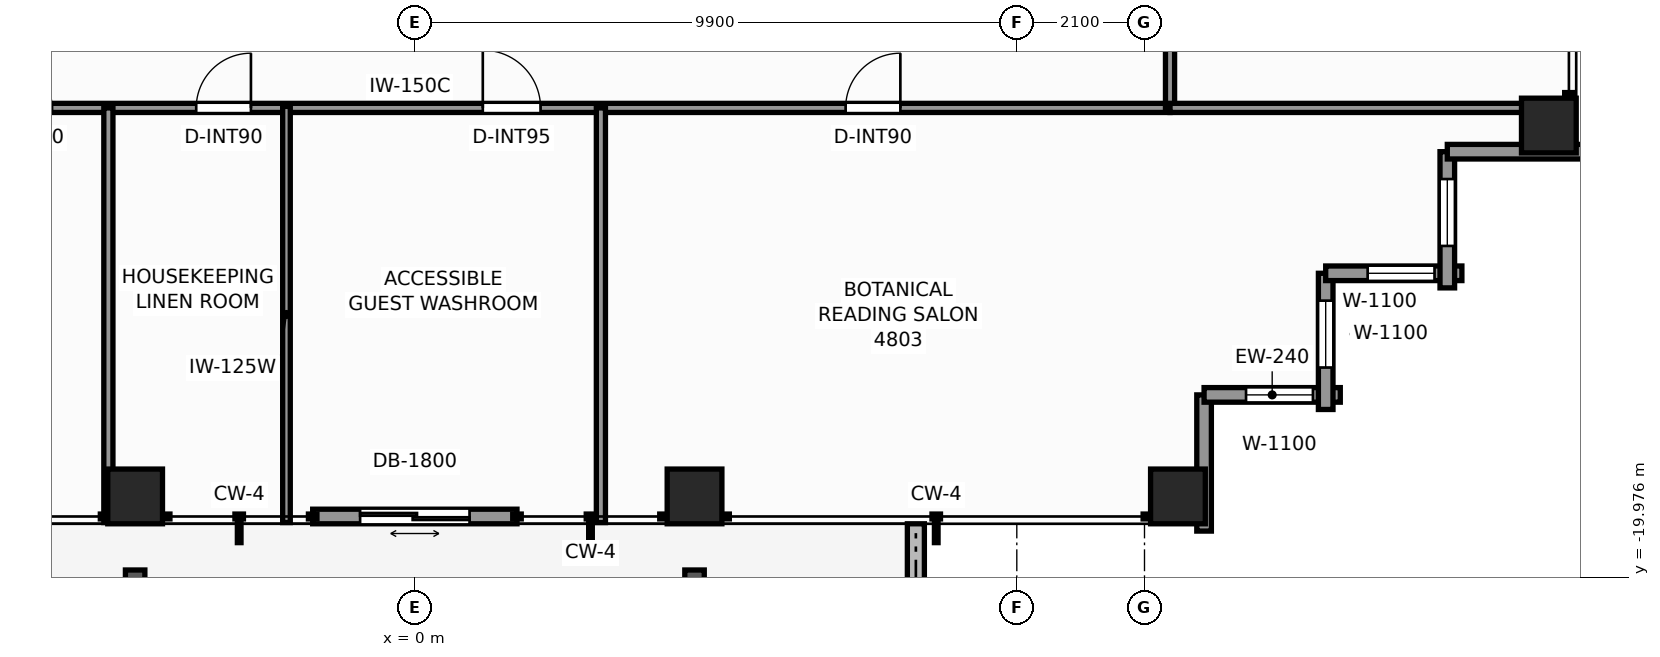
"""IFC4 building model, lengths in metres.
Left out: names, types, materials, properties, quantities, classifications, styles, units other than length and angle.
Written with IfcOpenShell. Run it as: python <this file> out.ifc"""

import sys

from ifc_helpers import new_model, si_unit, direction, frame, frame_2d, origin, origin_2d, place, context, subcontext, project, spatial, rectangle, extrude, element, fill, save


model = new_model("IFC4")
c1 = context("Model", 3, precision=1e-05, world=origin(), true_north=direction((0.0, 1.0)))
c2 = subcontext(c1, "Body", "Model", "MODEL_VIEW")
j1 = project(units=[si_unit("LENGTHUNIT", "METRE"), si_unit("PLANEANGLEUNIT", "RADIAN")], contexts=[c1])
p1 = place(None, origin())
s1 = spatial("IfcSite", under=j1, at=p1, CompositionType="ELEMENT")
p2 = place(p1, origin())
s2 = spatial("IfcBuilding", under=s1, at=p2, CompositionType="ELEMENT")
p3 = place(p2, frame((0.0, 0.0, 166.8)))
s3 = spatial("IfcBuildingStorey", under=s2, at=p3, CompositionType="ELEMENT", Elevation=166.8)
for number, where, z_axis, x_axis in (
    (1, (-4.6, -18.65, 0.0), (0.0, 0.0, 1.0), (1.0, 0.0, 0.0)),
    (2, (4.6, -18.65, 0.0), (0.0, 0.0, 1.0), (1.0, 0.0, 0.0)),
    (3, (12.55, -18.65, 0.0), (0.0, 0.0, 1.0), (1.0, 0.0, 0.0)),
    (4, (18.65, -12.55, 0.0), (0.0, 0.0, 1.0), (1.0, 0.0, 0.0)),
):
    element("IfcColumn", number, at=place(p3, frame(where, z_axis=z_axis, x_axis=x_axis)), inside=s3, PredefinedType="COLUMN", context=c2, shape_type="SweptSolid", body=[
        extrude(rectangle(XDim=0.9, YDim=0.9, at=origin_2d()), origin(), (0.0, 0.0, 1.0), 3.3),
    ])
p4 = place(p3, frame((8.24, -20.566, -0.02), z_axis=(0.0, 0.0, 1.0), x_axis=(0.0, 1.0, 0.0)))
e5 = element("IfcWall", 5, at=p4, inside=s3, PredefinedType="PARAPET", context=c2, shape_type="SweptSolid", body=[
    extrude(rectangle(XDim=1.466, YDim=0.28, at=frame_2d((0.733, 0.0))), origin(), (0.0, 0.0, 1.0), 0.42),
])
p5 = place(p3, frame((1.68, -18.98, 0.0), z_axis=(0.0, 0.0, 1.0), x_axis=(-1.0, 0.0, 0.0)))
e6 = element("IfcWall", 6, at=p5, inside=s3, PredefinedType="STANDARD", context=c2, shape_type="SweptSolid", body=[
    extrude(rectangle(XDim=3.36, YDim=0.24, at=frame_2d((1.68, 0.0))), origin(), (0.0, 0.0, 1.0), 3.1),
])
p6 = place(p5, frame((0.78, 0.0, 0.0)))
e7 = element("IfcOpeningElement", 7, at=p6, cuts=e6, PredefinedType="OPENING", context=c2, shape_type="SweptSolid", body=[
    extrude(rectangle(XDim=1.8, YDim=2.2, at=frame_2d((0.9, 1.1))), frame((0.0, 0.13, 0.0), z_axis=(0.0, -1.0, 0.0), x_axis=(1.0, 0.0, 0.0)), (0.0, 0.0, 1.0), 0.26),
])
p7 = place(p3, frame((12.98, -16.98, 0.0), z_axis=(0.0, 0.0, 1.0), x_axis=(0.0, -1.0, 0.0)))
e8 = element("IfcWall", 8, at=p7, inside=s3, PredefinedType="STANDARD", context=c2, shape_type="SweptSolid", body=[
    extrude(rectangle(XDim=2.24, YDim=0.24, at=frame_2d((1.12, 0.0))), origin(), (0.0, 0.0, 1.0), 2.483),
])
p8 = place(p3, frame((15.22, -16.98, 0.0), z_axis=(0.0, 0.0, 1.0), x_axis=(-1.0, 0.0, 0.0)))
e9 = element("IfcWall", 9, at=p8, inside=s3, PredefinedType="STANDARD", context=c2, shape_type="SweptSolid", body=[
    extrude(rectangle(XDim=2.24, YDim=0.24, at=frame_2d((1.12, 0.0))), origin(), (0.0, 0.0, 1.0), 2.483),
])
p9 = place(p8, frame((0.45, 0.0, 0.65)))
e10 = element("IfcOpeningElement", 10, at=p9, cuts=e9, PredefinedType="OPENING", context=c2, shape_type="SweptSolid", body=[
    extrude(rectangle(XDim=1.1, YDim=1.45, at=frame_2d((0.55, 0.725))), frame((0.0, 0.13, 0.0), z_axis=(0.0, -1.0, 0.0), x_axis=(1.0, 0.0, 0.0)), (0.0, 0.0, 1.0), 0.26),
])
p10 = place(p3, frame((14.98, -14.98, 0.0), z_axis=(0.0, 0.0, 1.0), x_axis=(0.0, -1.0, 0.0)))
e11 = element("IfcWall", 11, at=p10, inside=s3, PredefinedType="STANDARD", context=c2, shape_type="SweptSolid", body=[
    extrude(rectangle(XDim=2.24, YDim=0.24, at=frame_2d((1.12, 0.0))), origin(), (0.0, 0.0, 1.0), 2.483),
])
p11 = place(p10, frame((0.45, 0.0, 0.65)))
e12 = element("IfcOpeningElement", 12, at=p11, cuts=e11, PredefinedType="OPENING", context=c2, shape_type="SweptSolid", body=[
    extrude(rectangle(XDim=1.1, YDim=1.45, at=frame_2d((0.55, 0.725))), frame((0.0, 0.13, 0.0), z_axis=(0.0, -1.0, 0.0), x_axis=(1.0, 0.0, 0.0)), (0.0, 0.0, 1.0), 0.26),
])
p12 = place(p3, frame((17.22, -14.98, 0.0), z_axis=(0.0, 0.0, 1.0), x_axis=(-1.0, 0.0, 0.0)))
e13 = element("IfcWall", 13, at=p12, inside=s3, PredefinedType="STANDARD", context=c2, shape_type="SweptSolid", body=[
    extrude(rectangle(XDim=2.24, YDim=0.24, at=frame_2d((1.12, 0.0))), origin(), (0.0, 0.0, 1.0), 2.483),
])
p13 = place(p12, frame((0.45, 0.0, 0.65)))
e14 = element("IfcOpeningElement", 14, at=p13, cuts=e13, PredefinedType="OPENING", context=c2, shape_type="SweptSolid", body=[
    extrude(rectangle(XDim=1.1, YDim=1.45, at=frame_2d((0.55, 0.725))), frame((0.0, 0.13, 0.0), z_axis=(0.0, -1.0, 0.0), x_axis=(1.0, 0.0, 0.0)), (0.0, 0.0, 1.0), 0.26),
])
p14 = place(p3, frame((16.98, -12.98, 0.0), z_axis=(0.0, 0.0, 1.0), x_axis=(0.0, -1.0, 0.0)))
e15 = element("IfcWall", 15, at=p14, inside=s3, PredefinedType="STANDARD", context=c2, shape_type="SweptSolid", body=[
    extrude(rectangle(XDim=2.24, YDim=0.24, at=frame_2d((1.12, 0.0))), origin(), (0.0, 0.0, 1.0), 2.483),
])
p15 = place(p14, frame((0.45, 0.0, 0.65)))
e16 = element("IfcOpeningElement", 16, at=p15, cuts=e15, PredefinedType="OPENING", context=c2, shape_type="SweptSolid", body=[
    extrude(rectangle(XDim=1.1, YDim=1.45, at=frame_2d((0.55, 0.725))), frame((0.0, 0.13, 0.0), z_axis=(0.0, -1.0, 0.0), x_axis=(1.0, 0.0, 0.0)), (0.0, 0.0, 1.0), 0.26),
])
p16 = place(p3, frame((19.22, -12.98, 0.0), z_axis=(0.0, 0.0, 1.0), x_axis=(-1.0, 0.0, 0.0)))
e17 = element("IfcWall", 17, at=p16, inside=s3, PredefinedType="STANDARD", context=c2, shape_type="SweptSolid", body=[
    extrude(rectangle(XDim=2.24, YDim=0.24, at=frame_2d((1.12, 0.0))), origin(), (0.0, 0.0, 1.0), 2.483),
])
p17 = place(p3, frame((-12.58, -12.26, 0.0), z_axis=(0.0, 0.0, 1.0), x_axis=(1.0, 0.0, 0.0)))
e18 = element("IfcWall", 18, at=p17, inside=s3, PredefinedType="PARTITIONING", context=c2, shape_type="SweptSolid", body=[
    extrude(rectangle(XDim=25.0, YDim=0.15, at=frame_2d((12.5, 0.0))), origin(), (0.0, 0.0, 1.0), 2.389),
])
p18 = place(p17, frame((3.379, 0.0, 0.0)))
e19 = element("IfcOpeningElement", 19, at=p18, cuts=e18, PredefinedType="OPENING", context=c2, shape_type="SweptSolid", body=[
    extrude(rectangle(XDim=0.9, YDim=2.06, at=frame_2d((0.45, 1.03))), frame((0.0, 0.085, 0.0), z_axis=(0.0, -1.0, 0.0), x_axis=(1.0, 0.0, 0.0)), (0.0, 0.0, 1.0), 0.17),
])
p19 = place(p17, frame((5.714, 0.0, 0.0)))
e20 = element("IfcOpeningElement", 20, at=p19, cuts=e18, PredefinedType="OPENING", context=c2, shape_type="SweptSolid", body=[
    extrude(rectangle(XDim=0.9, YDim=2.06, at=frame_2d((0.45, 1.03))), frame((0.0, 0.085, 0.0), z_axis=(0.0, -1.0, 0.0), x_axis=(1.0, 0.0, 0.0)), (0.0, 0.0, 1.0), 0.17),
])
p20 = place(p17, frame((8.985, 0.0, 0.0)))
e21 = element("IfcOpeningElement", 21, at=p20, cuts=e18, PredefinedType="OPENING", context=c2, shape_type="SweptSolid", body=[
    extrude(rectangle(XDim=0.9, YDim=2.06, at=frame_2d((0.45, 1.03))), frame((0.0, 0.085, 0.0), z_axis=(0.0, -1.0, 0.0), x_axis=(1.0, 0.0, 0.0)), (0.0, 0.0, 1.0), 0.17),
])
p21 = place(p17, frame((13.698, 0.0, 0.0)))
e22 = element("IfcOpeningElement", 22, at=p21, cuts=e18, PredefinedType="OPENING", context=c2, shape_type="SweptSolid", body=[
    extrude(rectangle(XDim=0.95, YDim=2.06, at=frame_2d((0.475, 1.03))), frame((0.0, 0.085, 0.0), z_axis=(0.0, -1.0, 0.0), x_axis=(1.0, 0.0, 0.0)), (0.0, 0.0, 1.0), 0.17),
])
p22 = place(p17, frame((19.665, 0.0, 0.0)))
e23 = element("IfcOpeningElement", 23, at=p22, cuts=e18, PredefinedType="OPENING", context=c2, shape_type="SweptSolid", body=[
    extrude(rectangle(XDim=0.9, YDim=2.06, at=frame_2d((0.45, 1.03))), frame((0.0, 0.085, 0.0), z_axis=(0.0, -1.0, 0.0), x_axis=(1.0, 0.0, 0.0)), (0.0, 0.0, 1.0), 0.17),
])
p23 = place(p3, frame((12.42, -12.26, 0.0), z_axis=(0.0, 0.0, 1.0), x_axis=(0.0, 1.0, 0.0)))
e24 = element("IfcWall", 24, at=p23, inside=s3, PredefinedType="PARTITIONING", context=c2, shape_type="SweptSolid", body=[
    extrude(rectangle(XDim=24.84, YDim=0.15, at=frame_2d((12.42, 0.0))), origin(), (0.0, 0.0, 1.0), 2.389),
])
p24 = place(p23, frame((2.798, 0.0, 0.0)))
e25 = element("IfcOpeningElement", 25, at=p24, cuts=e24, PredefinedType="OPENING", context=c2, shape_type="SweptSolid", body=[
    extrude(rectangle(XDim=0.95, YDim=2.06, at=frame_2d((0.475, 1.03))), frame((0.0, 0.085, 0.0), z_axis=(0.0, -1.0, 0.0), x_axis=(1.0, 0.0, 0.0)), (0.0, 0.0, 1.0), 0.17),
])
p25 = place(p23, frame((9.633, 0.0, 0.0)))
e26 = element("IfcOpeningElement", 26, at=p25, cuts=e24, PredefinedType="OPENING", context=c2, shape_type="SweptSolid", body=[
    extrude(rectangle(XDim=0.95, YDim=2.06, at=frame_2d((0.475, 1.03))), frame((0.0, 0.085, 0.0), z_axis=(0.0, -1.0, 0.0), x_axis=(1.0, 0.0, 0.0)), (0.0, 0.0, 1.0), 0.17),
])
p26 = place(p23, frame((17.958, 0.0, 0.0)))
e27 = element("IfcOpeningElement", 27, at=p26, cuts=e24, PredefinedType="OPENING", context=c2, shape_type="SweptSolid", body=[
    extrude(rectangle(XDim=0.95, YDim=2.06, at=frame_2d((0.475, 1.03))), frame((0.0, 0.085, 0.0), z_axis=(0.0, -1.0, 0.0), x_axis=(1.0, 0.0, 0.0)), (0.0, 0.0, 1.0), 0.17),
])
p27 = place(p23, frame((20.184, 0.0, 0.0)))
e28 = element("IfcOpeningElement", 28, at=p27, cuts=e24, PredefinedType="OPENING", context=c2, shape_type="SweptSolid", body=[
    extrude(rectangle(XDim=0.95, YDim=2.06, at=frame_2d((0.475, 1.03))), frame((0.0, 0.085, 0.0), z_axis=(0.0, -1.0, 0.0), x_axis=(1.0, 0.0, 0.0)), (0.0, 0.0, 1.0), 0.17),
])
p28 = place(p3, frame((12.42, -12.26, 0.0), z_axis=(0.0, 0.0, 1.0), x_axis=(1.0, 0.0, 0.0)))
e29 = element("IfcWall", 29, at=p28, inside=s3, PredefinedType="PARTITIONING", context=c2, shape_type="SweptSolid", body=[
    extrude(rectangle(XDim=6.66, YDim=0.15, at=frame_2d((3.33, 0.0))), origin(), (0.0, 0.0, 1.0), 2.389),
])
for number, where, z_axis, x_axis in (
    (30, (-5.04, -19.08, 0.0), (0.0, 0.0, 1.0), (0.0, 1.0, 0.0)),
    (31, (3.06, -19.08, 0.0), (0.0, 0.0, 1.0), (0.0, 1.0, 0.0)),
):
    element("IfcWall", number, at=place(p3, frame(where, z_axis=z_axis, x_axis=x_axis)), inside=s3, PredefinedType="PARTITIONING", context=c2, shape_type="SweptSolid", body=[
        extrude(rectangle(XDim=6.82, YDim=0.15, at=frame_2d((3.41, 0.0))), origin(), (0.0, 0.0, 1.0), 2.473),
    ])
p29 = place(p3, frame((-2.111, -19.08, 0.0), z_axis=(0.0, 0.0, 1.0), x_axis=(0.0, 1.0, 0.0)))
e32 = element("IfcWall", 32, at=p29, inside=s3, PredefinedType="PARTITIONING", context=c2, shape_type="SweptSolid", body=[
    extrude(rectangle(XDim=6.845, YDim=0.125, at=frame_2d((3.422, 0.0))), origin(), (0.0, 0.0, 1.0), 2.473),
])
p30 = place(p6, origin())
e33 = element("IfcDoor", 33, at=p30, inside=s3, OperationType="DOUBLE_DOOR_SLIDING", PredefinedType="DOOR", context=c2, shape_type="SweptSolid", body=[
    extrude(rectangle(XDim=1.8, YDim=2.2, at=frame_2d((0.9, 1.1))), frame((0.0, 0.025, 0.0), z_axis=(0.0, -1.0, 0.0), x_axis=(1.0, 0.0, 0.0)), (0.0, 0.0, 1.0), 0.05),
])
fill(e7, e33)
p31 = place(p9, origin())
e34 = element("IfcWindow", 34, at=p31, inside=s3, PartitioningType="SINGLE_PANEL", PredefinedType="WINDOW", context=c2, shape_type="SweptSolid", body=[
    extrude(rectangle(XDim=1.1, YDim=1.45, at=frame_2d((0.55, 0.725))), frame((0.0, 0.03, 0.0), z_axis=(0.0, -1.0, 0.0), x_axis=(1.0, 0.0, 0.0)), (0.0, 0.0, 1.0), 0.06),
])
fill(e10, e34)
p32 = place(p11, origin())
e35 = element("IfcWindow", 35, at=p32, inside=s3, PartitioningType="SINGLE_PANEL", PredefinedType="WINDOW", context=c2, shape_type="SweptSolid", body=[
    extrude(rectangle(XDim=1.1, YDim=1.45, at=frame_2d((0.55, 0.725))), frame((0.0, 0.03, 0.0), z_axis=(0.0, -1.0, 0.0), x_axis=(1.0, 0.0, 0.0)), (0.0, 0.0, 1.0), 0.06),
])
fill(e12, e35)
p33 = place(p13, origin())
e36 = element("IfcWindow", 36, at=p33, inside=s3, PartitioningType="SINGLE_PANEL", PredefinedType="WINDOW", context=c2, shape_type="SweptSolid", body=[
    extrude(rectangle(XDim=1.1, YDim=1.45, at=frame_2d((0.55, 0.725))), frame((0.0, 0.03, 0.0), z_axis=(0.0, -1.0, 0.0), x_axis=(1.0, 0.0, 0.0)), (0.0, 0.0, 1.0), 0.06),
])
fill(e14, e36)
p34 = place(p15, origin())
e37 = element("IfcWindow", 37, at=p34, inside=s3, PartitioningType="SINGLE_PANEL", PredefinedType="WINDOW", context=c2, shape_type="SweptSolid", body=[
    extrude(rectangle(XDim=1.1, YDim=1.45, at=frame_2d((0.55, 0.725))), frame((0.0, 0.03, 0.0), z_axis=(0.0, -1.0, 0.0), x_axis=(1.0, 0.0, 0.0)), (0.0, 0.0, 1.0), 0.06),
])
fill(e16, e37)
p35 = place(p20, origin())
e38 = element("IfcDoor", 38, at=p35, inside=s3, OperationType="SINGLE_SWING_RIGHT", PredefinedType="DOOR", context=c2, shape_type="SweptSolid", body=[
    extrude(rectangle(XDim=0.9, YDim=2.06, at=frame_2d((0.45, 1.03))), frame((0.0, 0.025, 0.0), z_axis=(0.0, -1.0, 0.0), x_axis=(1.0, 0.0, 0.0)), (0.0, 0.0, 1.0), 0.05),
])
fill(e21, e38)
p36 = place(p21, origin())
e39 = element("IfcDoor", 39, at=p36, inside=s3, OperationType="SINGLE_SWING_LEFT", PredefinedType="DOOR", context=c2, shape_type="SweptSolid", body=[
    extrude(rectangle(XDim=0.95, YDim=2.06, at=frame_2d((0.475, 1.03))), frame((0.0, 0.025, 0.0), z_axis=(0.0, -1.0, 0.0), x_axis=(1.0, 0.0, 0.0)), (0.0, 0.0, 1.0), 0.05),
])
fill(e22, e39)
p37 = place(p22, origin())
e40 = element("IfcDoor", 40, at=p37, inside=s3, OperationType="SINGLE_SWING_RIGHT", PredefinedType="DOOR", context=c2, shape_type="SweptSolid", body=[
    extrude(rectangle(XDim=0.9, YDim=2.06, at=frame_2d((0.45, 1.03))), frame((0.0, 0.025, 0.0), z_axis=(0.0, -1.0, 0.0), x_axis=(1.0, 0.0, 0.0)), (0.0, 0.0, 1.0), 0.05),
])
fill(e23, e40)
save(model, sys.argv[1])
